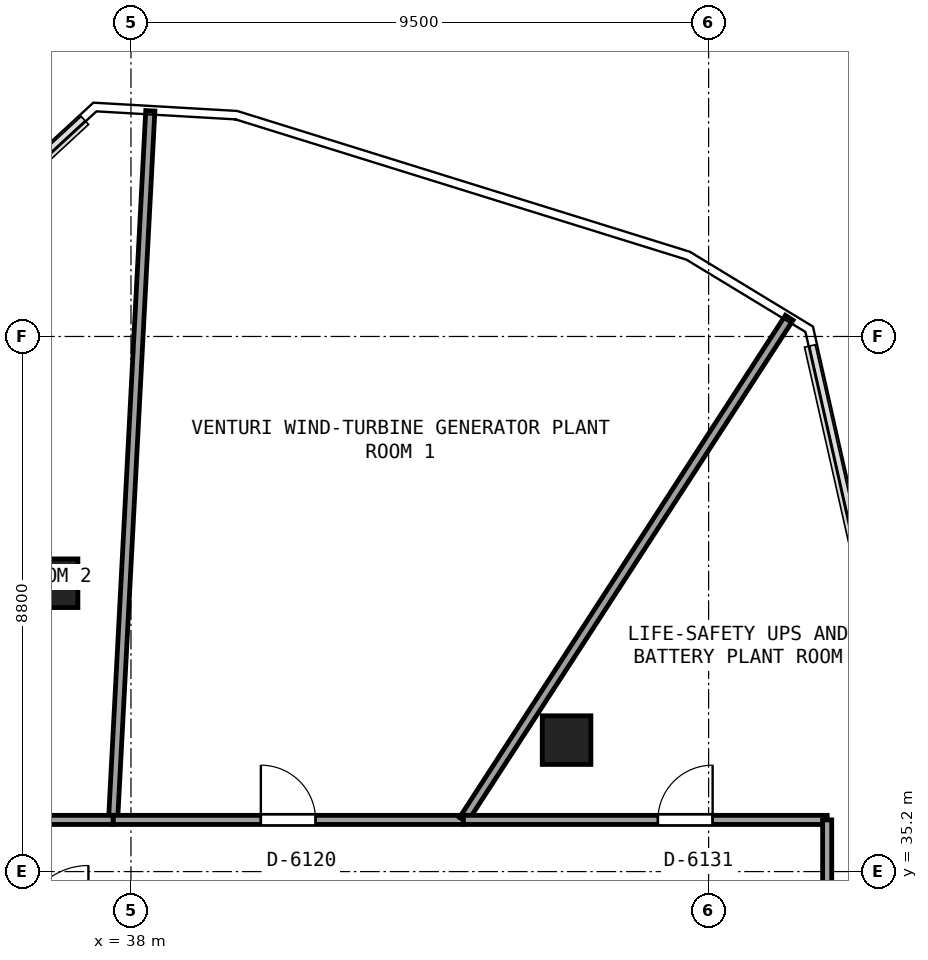
"""IFC4 building model, lengths in metres.
Left out: names, types, materials, properties, quantities, classifications, styles, units other than length and angle.
Written with IfcOpenShell. Run it as: python <this file> out.ifc"""

import sys

from ifc_helpers import new_model, si_unit, direction, frame, frame_2d, origin, origin_2d, place, context, subcontext, project, spatial, rectangle, extrude, element, fill, save


model = new_model("IFC4")
c1 = context("Model", 3, precision=1e-05, world=origin(), true_north=direction((0.0, 1.0)))
c2 = subcontext(c1, "Body", "Model", "MODEL_VIEW")
j1 = project(units=[si_unit("LENGTHUNIT", "METRE"), si_unit("PLANEANGLEUNIT", "RADIAN")], contexts=[c1])
p1 = place(None, origin())
s1 = spatial("IfcSite", under=j1, at=p1, CompositionType="ELEMENT")
p2 = place(p1, origin())
s2 = spatial("IfcBuilding", under=s1, at=p2, CompositionType="ELEMENT")
p3 = place(p2, frame((0.0, 0.0, 228.3)))
s3 = spatial("IfcBuildingStorey", under=s2, at=p3, CompositionType="ELEMENT", Elevation=228.3)
for number, where, z_axis, x_axis in (
    (1, (45.164, 37.362, -0.345), (0.0, 0.0, 1.0), (1.0, 0.0, 0.0)),
    (2, (36.727, 39.942, -0.345), (0.0, 0.0, 1.0), (1.0, 0.0, 0.0)),
):
    element("IfcColumn", number, at=place(p3, frame(where, z_axis=z_axis, x_axis=x_axis)), inside=s3, PredefinedType="COLUMN", context=c2, shape_type="SweptSolid", body=[
        extrude(rectangle(XDim=0.8, YDim=0.8, at=origin_2d()), origin(), (0.0, 0.0, 1.0), 3.585),
    ])
p4 = place(p3, frame((38.318, 47.711, 0.0), z_axis=(0.0, 0.0, 1.0), x_axis=(-0.052416173525, -0.998625327514, 0.0)))
e3 = element("IfcWall", 3, at=p4, inside=s3, PredefinedType="PARTITIONING", context=c2, shape_type="SweptSolid", body=[
    extrude(rectangle(XDim=11.677, YDim=0.15, at=frame_2d((5.838, 0.0))), origin(), (0.0, 0.0, 1.0), 2.765),
])
p5 = place(p3, frame((37.706, 36.05, 0.0), z_axis=(0.0, 0.0, 1.0), x_axis=(1.0, 0.0, 0.0)))
e4 = element("IfcWall", 4, at=p5, inside=s3, PredefinedType="PARTITIONING", context=c2, shape_type="SweptSolid", body=[
    extrude(rectangle(XDim=5.761, YDim=0.15, at=frame_2d((2.88, 0.0))), origin(), (0.0, 0.0, 1.0), 2.913),
])
p6 = place(p5, frame((2.43, 0.0, 0.0)))
e5 = element("IfcOpeningElement", 5, at=p6, cuts=e4, PredefinedType="OPENING", context=c2, shape_type="SweptSolid", body=[
    extrude(rectangle(XDim=0.9, YDim=2.0, at=frame_2d((0.45, 1.0))), frame((0.0, 0.085, 0.0), z_axis=(0.0, -1.0, 0.0), x_axis=(1.0, 0.0, 0.0)), (0.0, 0.0, 1.0), 0.17),
])
p7 = place(p3, frame((43.467, 36.05, 0.0), z_axis=(0.0, 0.0, 1.0), x_axis=(0.544343030284, 0.838862721416, 0.0)))
e6 = element("IfcWall", 6, at=p7, inside=s3, PredefinedType="PARTITIONING", context=c2, shape_type="SweptSolid", body=[
    extrude(rectangle(XDim=9.843, YDim=0.15, at=frame_2d((4.921, 0.0))), origin(), (0.0, 0.0, 1.0), 2.765),
])
p8 = place(p3, frame((32.283, 36.05, 0.0), z_axis=(0.0, 0.0, 1.0), x_axis=(1.0, 0.0, 0.0)))
e7 = element("IfcWall", 7, at=p8, inside=s3, PredefinedType="PARTITIONING", context=c2, shape_type="SweptSolid", body=[
    extrude(rectangle(XDim=5.423, YDim=0.15, at=frame_2d((2.711, 0.0))), origin(), (0.0, 0.0, 1.0), 2.689),
])
p9 = place(p8, frame((2.262, 0.0, 0.0)))
e8 = element("IfcOpeningElement", 8, at=p9, cuts=e7, PredefinedType="OPENING", context=c2, shape_type="SweptSolid", body=[
    extrude(rectangle(XDim=0.9, YDim=2.0, at=frame_2d((0.45, 1.0))), frame((0.0, 0.085, 0.0), z_axis=(0.0, -1.0, 0.0), x_axis=(1.0, 0.0, 0.0)), (0.0, 0.0, 1.0), 0.17),
])
p10 = place(p3, frame((43.467, 36.05, 0.0), z_axis=(0.0, 0.0, 1.0), x_axis=(1.0, 0.0, 0.0)))
e9 = element("IfcWall", 9, at=p10, inside=s3, PredefinedType="PARTITIONING", context=c2, shape_type="SweptSolid", body=[
    extrude(rectangle(XDim=5.983, YDim=0.15, at=frame_2d((2.991, 0.0))), origin(), (0.0, 0.0, 1.0), 2.689),
])
p11 = place(p10, frame((3.199, 0.0, 0.0)))
e10 = element("IfcOpeningElement", 10, at=p11, cuts=e9, PredefinedType="OPENING", context=c2, shape_type="SweptSolid", body=[
    extrude(rectangle(XDim=0.9, YDim=2.0, at=frame_2d((0.45, 1.0))), frame((0.0, 0.085, 0.0), z_axis=(0.0, -1.0, 0.0), x_axis=(1.0, 0.0, 0.0)), (0.0, 0.0, 1.0), 0.17),
])
p12 = place(p3, frame((49.45, 36.05, 0.0), z_axis=(0.0, 0.0, 1.0), x_axis=(0.0, -1.0, 0.0)))
e11 = element("IfcWall", 11, at=p12, inside=s3, PredefinedType="PARTITIONING", context=c2, shape_type="SweptSolid", body=[
    extrude(rectangle(XDim=1.85, YDim=0.15, at=frame_2d((0.925, 0.0))), origin(), (0.0, 0.0, 1.0), 3.24),
])
p13 = place(p6, origin())
e12 = element("IfcDoor", 12, at=p13, inside=s3, OperationType="SINGLE_SWING_LEFT", PredefinedType="DOOR", context=c2, shape_type="SweptSolid", body=[
    extrude(rectangle(XDim=0.9, YDim=2.0, at=frame_2d((0.45, 1.0))), frame((0.0, 0.025, 0.0), z_axis=(0.0, -1.0, 0.0), x_axis=(1.0, 0.0, 0.0)), (0.0, 0.0, 1.0), 0.05),
])
fill(e5, e12)
p14 = place(p11, origin())
e13 = element("IfcDoor", 13, at=p14, inside=s3, OperationType="SINGLE_SWING_RIGHT", PredefinedType="DOOR", context=c2, shape_type="SweptSolid", body=[
    extrude(rectangle(XDim=0.9, YDim=2.0, at=frame_2d((0.45, 1.0))), frame((0.0, 0.025, 0.0), z_axis=(0.0, -1.0, 0.0), x_axis=(1.0, 0.0, 0.0)), (0.0, 0.0, 1.0), 0.05),
])
fill(e10, e13)
save(model, sys.argv[1])
